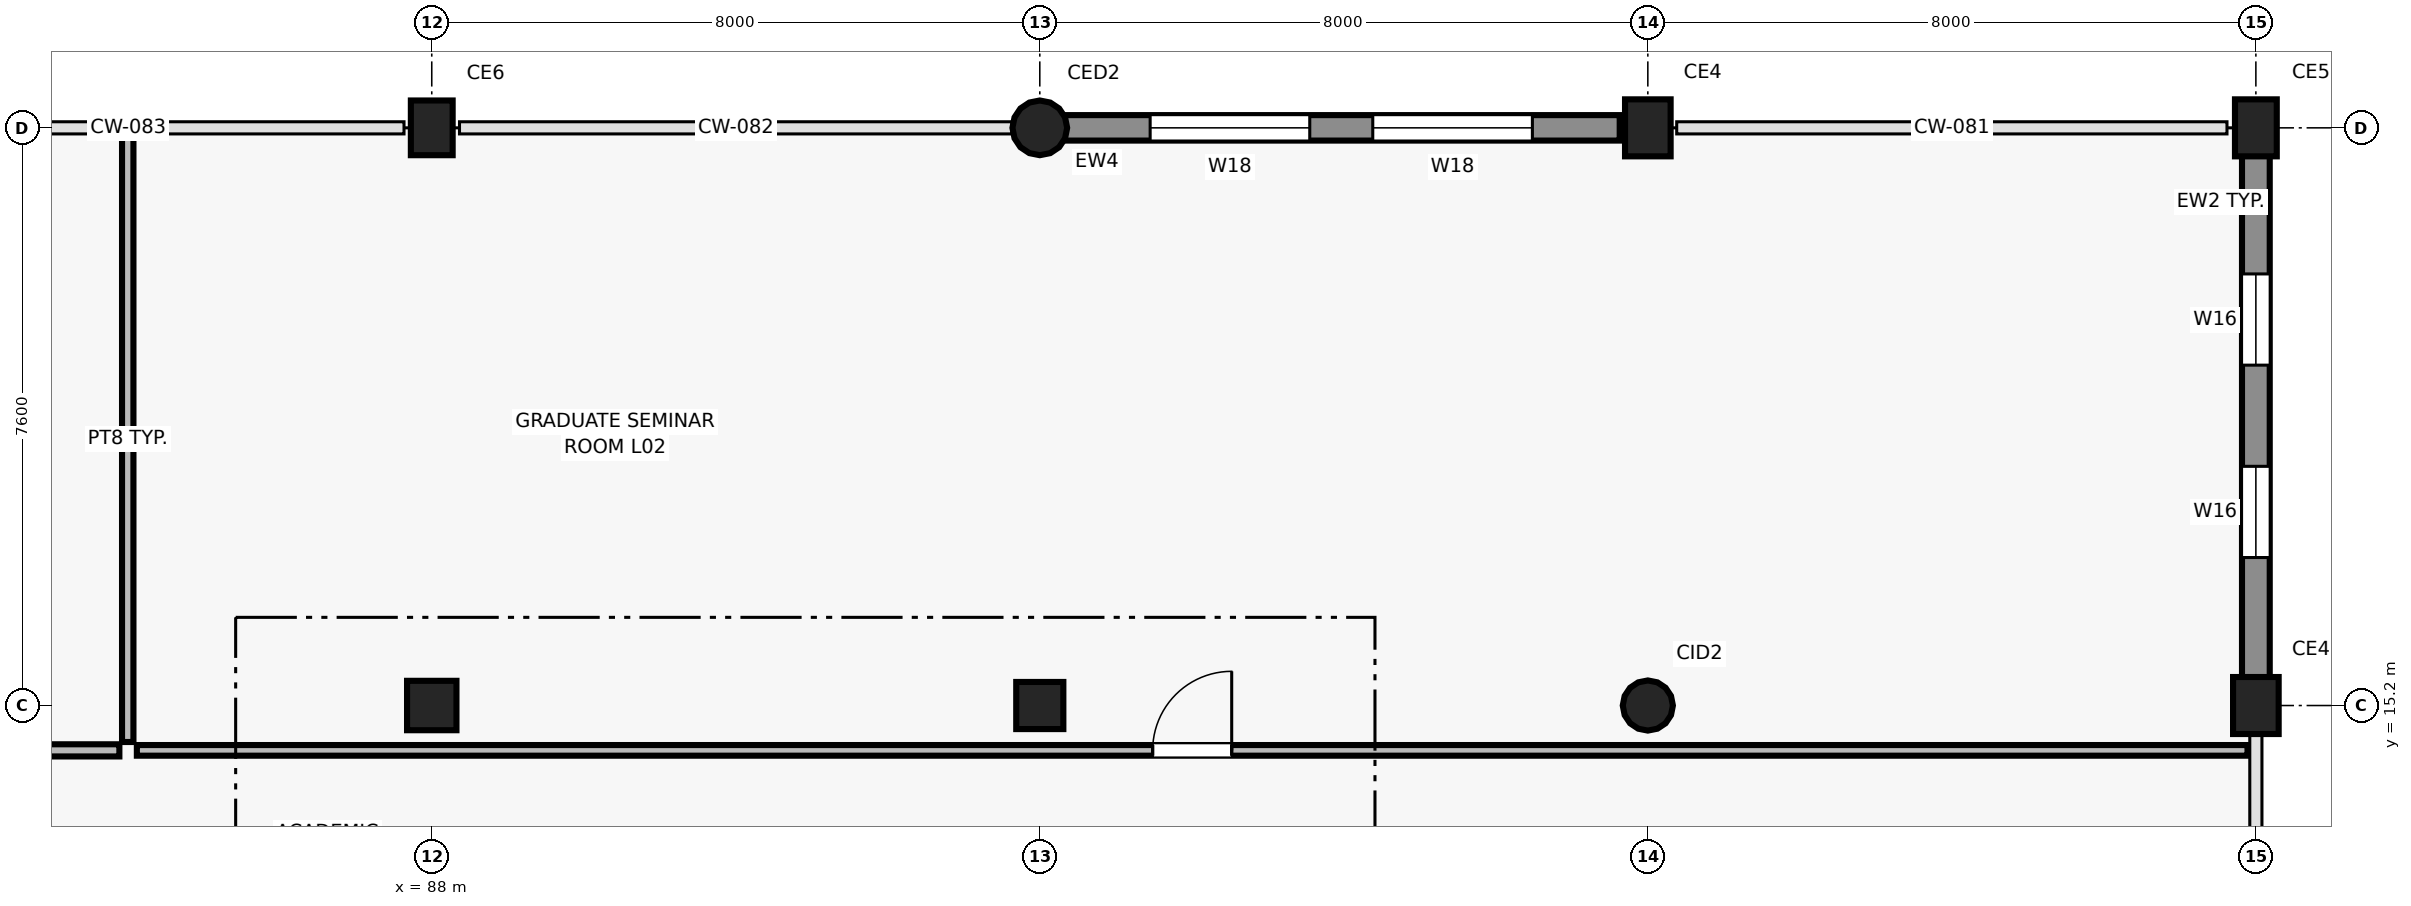
"""IFC4 building model, lengths in metres.
Left out: names, types, materials, properties, quantities, classifications, styles, units other than length and angle.
Written with IfcOpenShell. Run it as: python <this file> out.ifc"""

import sys

from ifc_helpers import new_model, si_unit, direction, frame, frame_2d, origin, origin_2d, place, context, subcontext, project, spatial, rectangle, circle, extrude, element, fill, save


model = new_model("IFC4")
c1 = context("Model", 3, precision=1e-05, world=origin(), true_north=direction((0.0, 1.0)))
c2 = subcontext(c1, "Body", "Model", "MODEL_VIEW")
j1 = project(units=[si_unit("LENGTHUNIT", "METRE"), si_unit("PLANEANGLEUNIT", "RADIAN")], contexts=[c1])
p1 = place(None, origin())
s1 = spatial("IfcSite", under=j1, at=p1, CompositionType="ELEMENT")
p2 = place(p1, origin())
s2 = spatial("IfcBuilding", under=s1, at=p2, CompositionType="ELEMENT")
p3 = place(p2, frame((0.0, 0.0, 9.0)))
s3 = spatial("IfcBuildingStorey", under=s2, at=p3, CompositionType="ELEMENT", Elevation=9.0)
p4 = place(p3, frame((88.0, 15.2, 0.0), z_axis=(0.0, 0.0, 1.0), x_axis=(1.0, 0.0, 0.0)))
e1 = element("IfcColumn", 1, at=p4, inside=s3, PredefinedType="COLUMN", context=c2, shape_type="SweptSolid", body=[
    extrude(rectangle(XDim=0.65, YDim=0.65, at=origin_2d()), origin(), (0.0, 0.0, 1.0), 4.2),
])
p5 = place(p3, frame((88.0, 22.8, 0.0), z_axis=(0.0, 0.0, 1.0), x_axis=(1.0, 0.0, 0.0)))
e2 = element("IfcColumn", 2, at=p5, inside=s3, PredefinedType="COLUMN", context=c2, shape_type="SweptSolid", body=[
    extrude(rectangle(XDim=0.72, YDim=0.55, at=origin_2d()), origin(), (0.0, 0.0, 1.0), 4.2),
])
p6 = place(p3, frame((96.0, 15.2, 0.0), z_axis=(0.0, 0.0, 1.0), x_axis=(1.0, 0.0, 0.0)))
e3 = element("IfcColumn", 3, at=p6, inside=s3, PredefinedType="COLUMN", context=c2, shape_type="SweptSolid", body=[
    extrude(rectangle(XDim=0.62, YDim=0.62, at=origin_2d()), origin(), (0.0, 0.0, 1.0), 4.2),
])
p7 = place(p3, frame((96.0, 22.8, 0.0), z_axis=(0.0, 0.0, 1.0), x_axis=(1.0, 0.0, 0.0)))
e4 = element("IfcColumn", 4, at=p7, inside=s3, PredefinedType="COLUMN", context=c2, shape_type="SweptSolid", body=[
    extrude(circle(Radius=0.36, at=origin_2d()), origin(), (0.0, 0.0, 1.0), 4.2),
])
p8 = place(p3, frame((104.0, 15.2, 0.0), z_axis=(0.0, 0.0, 1.0), x_axis=(1.0, 0.0, 0.0)))
e5 = element("IfcColumn", 5, at=p8, inside=s3, PredefinedType="COLUMN", context=c2, shape_type="SweptSolid", body=[
    extrude(circle(Radius=0.33, at=origin_2d()), origin(), (0.0, 0.0, 1.0), 4.2),
])
for number, where, z_axis, x_axis in (
    (6, (104.0, 22.8, 0.0), (0.0, 0.0, 1.0), (1.0, 0.0, 0.0)),
    (7, (112.0, 15.2, 0.0), (0.0, 0.0, 1.0), (1.0, 0.0, 0.0)),
):
    element("IfcColumn", number, at=place(p3, frame(where, z_axis=z_axis, x_axis=x_axis)), inside=s3, PredefinedType="COLUMN", context=c2, shape_type="SweptSolid", body=[
        extrude(rectangle(XDim=0.75, YDim=0.6, at=origin_2d()), origin(), (0.0, 0.0, 1.0), 4.2),
    ])
p9 = place(p3, frame((112.0, 22.8, 0.0), z_axis=(0.0, 0.0, 1.0), x_axis=(1.0, 0.0, 0.0)))
e8 = element("IfcColumn", 8, at=p9, inside=s3, PredefinedType="COLUMN", context=c2, shape_type="SweptSolid", body=[
    extrude(rectangle(XDim=0.75, YDim=0.55, at=origin_2d()), origin(), (0.0, 0.0, 1.0), 4.2),
])
p10 = place(p3, frame((112.0, 15.495, 0.0), z_axis=(0.0, 0.0, 1.0), x_axis=(0.0, 1.0, 0.0)))
e9 = element("IfcWall", 9, at=p10, inside=s3, PredefinedType="SOLIDWALL", context=c2, shape_type="SweptSolid", body=[
    extrude(rectangle(XDim=7.035, YDim=0.365, at=frame_2d((3.518, 0.0))), origin(), (0.0, 0.0, 1.0), 3.46),
])
p11 = place(p10, frame((1.652, 0.0, 0.9)))
e10 = element("IfcOpeningElement", 10, at=p11, cuts=e9, PredefinedType="OPENING", context=c2, shape_type="SweptSolid", body=[
    extrude(rectangle(XDim=1.2, YDim=1.5, at=frame_2d((0.6, 0.75))), frame((0.0, 0.192, 0.0), z_axis=(0.0, -1.0, 0.0), x_axis=(1.0, 0.0, 0.0)), (0.0, 0.0, 1.0), 0.385),
])
p12 = place(p10, frame((4.183, 0.0, 0.9)))
e11 = element("IfcOpeningElement", 11, at=p12, cuts=e9, PredefinedType="OPENING", context=c2, shape_type="SweptSolid", body=[
    extrude(rectangle(XDim=1.2, YDim=1.5, at=frame_2d((0.6, 0.75))), frame((0.0, 0.192, 0.0), z_axis=(0.0, -1.0, 0.0), x_axis=(1.0, 0.0, 0.0)), (0.0, 0.0, 1.0), 0.385),
])
p13 = place(p3, frame((103.63, 22.8, 0.0), z_axis=(0.0, 0.0, 1.0), x_axis=(-1.0, 0.0, 0.0)))
e12 = element("IfcWall", 12, at=p13, inside=s3, PredefinedType="SOLIDWALL", context=c2, shape_type="SweptSolid", body=[
    extrude(rectangle(XDim=7.327, YDim=0.335, at=frame_2d((3.664, 0.0))), origin(), (0.0, 0.0, 1.0), 3.27),
])
p14 = place(p13, frame((1.149, 0.0, 0.9)))
e13 = element("IfcOpeningElement", 13, at=p14, cuts=e12, PredefinedType="OPENING", context=c2, shape_type="SweptSolid", body=[
    extrude(rectangle(XDim=2.1, YDim=1.25, at=frame_2d((1.05, 0.625))), frame((0.0, 0.177, 0.0), z_axis=(0.0, -1.0, 0.0), x_axis=(1.0, 0.0, 0.0)), (0.0, 0.0, 1.0), 0.355),
])
p15 = place(p13, frame((4.078, 0.0, 0.9)))
e14 = element("IfcOpeningElement", 14, at=p15, cuts=e12, PredefinedType="OPENING", context=c2, shape_type="SweptSolid", body=[
    extrude(rectangle(XDim=2.1, YDim=1.25, at=frame_2d((1.05, 0.625))), frame((0.0, 0.177, 0.0), z_axis=(0.0, -1.0, 0.0), x_axis=(1.0, 0.0, 0.0)), (0.0, 0.0, 1.0), 0.355),
])
p16 = place(p3, frame((56.119, 14.61, 0.0), z_axis=(0.0, 0.0, 1.0), x_axis=(1.0, 0.0, 0.0)))
e15 = element("IfcWall", 15, at=p16, inside=s3, PredefinedType="PARTITIONING", context=c2, shape_type="SweptSolid", body=[
    extrude(rectangle(XDim=27.771, YDim=0.16, at=frame_2d((13.885, 0.0))), origin(), (0.0, 0.0, 1.0), 3.9),
])
p17 = place(p16, frame((13.386, 0.0, 0.0)))
e16 = element("IfcOpeningElement", 16, at=p17, cuts=e15, PredefinedType="OPENING", context=c2, shape_type="SweptSolid", body=[
    extrude(rectangle(XDim=1.0, YDim=2.15, at=frame_2d((0.5, 1.075))), frame((0.0, 0.09, 0.0), z_axis=(0.0, -1.0, 0.0), x_axis=(1.0, 0.0, 0.0)), (0.0, 0.0, 1.0), 0.18),
])
p18 = place(p3, frame((84.0, 14.72, 0.0), z_axis=(0.0, 0.0, 1.0), x_axis=(0.0, 1.0, 0.0)))
e17 = element("IfcWall", 17, at=p18, inside=s3, PredefinedType="PARTITIONING", context=c2, shape_type="SweptSolid", body=[
    extrude(rectangle(XDim=7.97, YDim=0.15, at=frame_2d((3.985, 0.0))), origin(), (0.0, 0.0, 1.0), 3.9),
])
p19 = place(p3, frame((84.12, 14.61, 0.0), z_axis=(0.0, 0.0, 1.0), x_axis=(1.0, 0.0, 0.0)))
e18 = element("IfcWall", 18, at=p19, inside=s3, PredefinedType="PARTITIONING", context=c2, shape_type="SweptSolid", body=[
    extrude(rectangle(XDim=27.77, YDim=0.14, at=frame_2d((13.885, 0.0))), origin(), (0.0, 0.0, 1.0), 3.9),
])
p20 = place(p19, frame((13.365, 0.0, 0.0)))
e19 = element("IfcOpeningElement", 19, at=p20, cuts=e18, PredefinedType="OPENING", context=c2, shape_type="SweptSolid", body=[
    extrude(rectangle(XDim=1.04, YDim=2.15, at=frame_2d((0.52, 1.075))), frame((0.0, 0.08, 0.0), z_axis=(0.0, -1.0, 0.0), x_axis=(1.0, 0.0, 0.0)), (0.0, 0.0, 1.0), 0.16),
])
p21 = place(p11, origin())
e20 = element("IfcWindow", 20, at=p21, inside=s3, PartitioningType="SINGLE_PANEL", PredefinedType="WINDOW", context=c2, shape_type="SweptSolid", body=[
    extrude(rectangle(XDim=1.2, YDim=1.5, at=frame_2d((0.6, 0.75))), frame((0.0, 0.03, 0.0), z_axis=(0.0, -1.0, 0.0), x_axis=(1.0, 0.0, 0.0)), (0.0, 0.0, 1.0), 0.06),
])
fill(e10, e20)
p22 = place(p12, origin())
e21 = element("IfcWindow", 21, at=p22, inside=s3, PartitioningType="SINGLE_PANEL", PredefinedType="WINDOW", context=c2, shape_type="SweptSolid", body=[
    extrude(rectangle(XDim=1.2, YDim=1.5, at=frame_2d((0.6, 0.75))), frame((0.0, 0.03, 0.0), z_axis=(0.0, -1.0, 0.0), x_axis=(1.0, 0.0, 0.0)), (0.0, 0.0, 1.0), 0.06),
])
fill(e11, e21)
p23 = place(p14, origin())
e22 = element("IfcWindow", 22, at=p23, inside=s3, PartitioningType="SINGLE_PANEL", PredefinedType="WINDOW", context=c2, shape_type="SweptSolid", body=[
    extrude(rectangle(XDim=2.1, YDim=1.25, at=frame_2d((1.05, 0.625))), frame((0.0, 0.03, 0.0), z_axis=(0.0, -1.0, 0.0), x_axis=(1.0, 0.0, 0.0)), (0.0, 0.0, 1.0), 0.06),
])
fill(e13, e22)
p24 = place(p15, origin())
e23 = element("IfcWindow", 23, at=p24, inside=s3, PartitioningType="SINGLE_PANEL", PredefinedType="WINDOW", context=c2, shape_type="SweptSolid", body=[
    extrude(rectangle(XDim=2.1, YDim=1.25, at=frame_2d((1.05, 0.625))), frame((0.0, 0.03, 0.0), z_axis=(0.0, -1.0, 0.0), x_axis=(1.0, 0.0, 0.0)), (0.0, 0.0, 1.0), 0.06),
])
fill(e14, e23)
p25 = place(p20, origin())
e24 = element("IfcDoor", 24, at=p25, inside=s3, OperationType="SINGLE_SWING_RIGHT", PredefinedType="DOOR", context=c2, shape_type="SweptSolid", body=[
    extrude(rectangle(XDim=1.04, YDim=2.15, at=frame_2d((0.52, 1.075))), frame((0.0, 0.025, 0.0), z_axis=(0.0, -1.0, 0.0), x_axis=(1.0, 0.0, 0.0)), (0.0, 0.0, 1.0), 0.05),
])
fill(e19, e24)
save(model, sys.argv[1])
